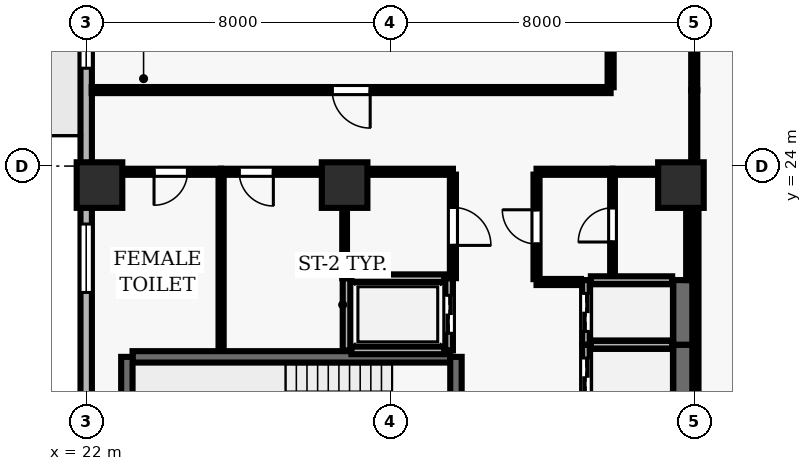
"""IFC4 building model, lengths in metres.
Left out: names, types, materials, properties, quantities, classifications, styles, units other than length and angle.
Written with IfcOpenShell. Run it as: python <this file> out.ifc"""

import sys

from ifc_helpers import new_model, si_unit, direction, frame, frame_2d, origin, origin_2d, place, context, subcontext, project, spatial, rectangle, extrude, element, fill, save


model = new_model("IFC4")
c1 = context("Model", 3, precision=1e-05, world=origin(), true_north=direction((0.0, 1.0)))
c2 = subcontext(c1, "Body", "Model", "MODEL_VIEW")
j1 = project(units=[si_unit("LENGTHUNIT", "METRE"), si_unit("PLANEANGLEUNIT", "RADIAN")], contexts=[c1])
p1 = place(None, origin())
s1 = spatial("IfcSite", under=j1, at=p1, CompositionType="ELEMENT")
p2 = place(p1, origin())
s2 = spatial("IfcBuilding", under=s1, at=p2, CompositionType="ELEMENT")
p3 = place(p2, frame((0.0, 0.0, 111.2)))
s3 = spatial("IfcBuildingStorey", under=s2, at=p3, CompositionType="ELEMENT", Elevation=111.2)
for number, where, z_axis, x_axis in (
    (1, (22.35, 23.5, 0.0), (0.0, 0.0, 1.0), (1.0, 0.0, 0.0)),
    (2, (28.8, 23.5, 0.0), (0.0, 0.0, 1.0), (1.0, 0.0, 0.0)),
    (3, (37.65, 23.5, 0.0), (0.0, 0.0, 1.0), (1.0, 0.0, 0.0)),
):
    element("IfcColumn", number, at=place(p3, frame(where, z_axis=z_axis, x_axis=x_axis)), inside=s3, PredefinedType="COLUMN", context=c2, shape_type="SweptSolid", body=[
        extrude(rectangle(XDim=1.2, YDim=1.2, at=origin_2d()), origin(), (0.0, 0.0, 1.0), 3.9),
    ])
p4 = place(p3, frame((22.0, 46.1, 0.0), z_axis=(0.0, 0.0, 1.0), x_axis=(0.0, -1.0, 0.0)))
e4 = element("IfcWall", 4, at=p4, inside=s3, PredefinedType="SOLIDWALL", context=c2, shape_type="SweptSolid", body=[
    extrude(rectangle(XDim=43.6, YDim=0.3, at=frame_2d((21.8, 0.0))), origin(), (0.0, 0.0, 1.0), 3.69),
])
p5 = place(p4, frame((7.1, 0.0, 0.0)))
e5 = element("IfcOpeningElement", 5, at=p5, cuts=e4, PredefinedType="OPENING", context=c2, shape_type="SweptSolid", body=[
    extrude(rectangle(XDim=1.0, YDim=2.2, at=frame_2d((0.5, 1.1))), frame((0.0, 0.16, 0.0), z_axis=(0.0, -1.0, 0.0), x_axis=(1.0, 0.0, 0.0)), (0.0, 0.0, 1.0), 0.32),
])
p6 = place(p4, frame((1.825, 0.0, 0.9)))
e6 = element("IfcOpeningElement", 6, at=p6, cuts=e4, PredefinedType="OPENING", context=c2, shape_type="SweptSolid", body=[
    extrude(rectangle(XDim=1.8, YDim=1.6, at=frame_2d((0.9, 0.8))), frame((0.0, 0.16, 0.0), z_axis=(0.0, -1.0, 0.0), x_axis=(1.0, 0.0, 0.0)), (0.0, 0.0, 1.0), 0.32),
])
p7 = place(p4, frame((13.175, 0.0, 0.9)))
e7 = element("IfcOpeningElement", 7, at=p7, cuts=e4, PredefinedType="OPENING", context=c2, shape_type="SweptSolid", body=[
    extrude(rectangle(XDim=1.8, YDim=1.6, at=frame_2d((0.9, 0.8))), frame((0.0, 0.16, 0.0), z_axis=(0.0, -1.0, 0.0), x_axis=(1.0, 0.0, 0.0)), (0.0, 0.0, 1.0), 0.32),
])
p8 = place(p4, frame((17.725, 0.0, 0.9)))
e8 = element("IfcOpeningElement", 8, at=p8, cuts=e4, PredefinedType="OPENING", context=c2, shape_type="SweptSolid", body=[
    extrude(rectangle(XDim=1.8, YDim=1.6, at=frame_2d((0.9, 0.8))), frame((0.0, 0.16, 0.0), z_axis=(0.0, -1.0, 0.0), x_axis=(1.0, 0.0, 0.0)), (0.0, 0.0, 1.0), 0.32),
])
p9 = place(p4, frame((23.625, 0.0, 0.9)))
e9 = element("IfcOpeningElement", 9, at=p9, cuts=e4, PredefinedType="OPENING", context=c2, shape_type="SweptSolid", body=[
    extrude(rectangle(XDim=1.8, YDim=1.6, at=frame_2d((0.9, 0.8))), frame((0.0, 0.16, 0.0), z_axis=(0.0, -1.0, 0.0), x_axis=(1.0, 0.0, 0.0)), (0.0, 0.0, 1.0), 0.32),
])
p10 = place(p4, frame((28.625, 0.0, 0.9)))
e10 = element("IfcOpeningElement", 10, at=p10, cuts=e4, PredefinedType="OPENING", context=c2, shape_type="SweptSolid", body=[
    extrude(rectangle(XDim=1.8, YDim=1.6, at=frame_2d((0.9, 0.8))), frame((0.0, 0.16, 0.0), z_axis=(0.0, -1.0, 0.0), x_axis=(1.0, 0.0, 0.0)), (0.0, 0.0, 1.0), 0.32),
])
p11 = place(p4, frame((34.525, 0.0, 0.9)))
e11 = element("IfcOpeningElement", 11, at=p11, cuts=e4, PredefinedType="OPENING", context=c2, shape_type="SweptSolid", body=[
    extrude(rectangle(XDim=1.8, YDim=1.6, at=frame_2d((0.9, 0.8))), frame((0.0, 0.16, 0.0), z_axis=(0.0, -1.0, 0.0), x_axis=(1.0, 0.0, 0.0)), (0.0, 0.0, 1.0), 0.32),
])
p12 = place(p3, frame((31.58, 18.98, 0.0), z_axis=(0.0, 0.0, 1.0), x_axis=(-1.0, 0.0, 0.0)))
e12 = element("IfcWall", 12, at=p12, inside=s3, PredefinedType="SHEAR", context=c2, shape_type="SweptSolid", body=[
    extrude(rectangle(XDim=8.36, YDim=0.3, at=frame_2d((4.18, 0.0))), origin(), (0.0, 0.0, 1.0), 3.69),
])
p13 = place(p3, frame((23.07, 18.98, 0.0), z_axis=(0.0, 0.0, 1.0), x_axis=(0.0, -1.0, 0.0)))
e13 = element("IfcWall", 13, at=p13, inside=s3, PredefinedType="SHEAR", context=c2, shape_type="SweptSolid", body=[
    extrude(rectangle(XDim=3.51, YDim=0.3, at=frame_2d((1.755, 0.0))), origin(), (0.0, 0.0, 1.0), 3.69),
])
p14 = place(p3, frame((31.73, 15.47, 0.0), z_axis=(0.0, 0.0, 1.0), x_axis=(0.0, 1.0, 0.0)))
e14 = element("IfcWall", 14, at=p14, inside=s3, PredefinedType="SHEAR", context=c2, shape_type="SweptSolid", body=[
    extrude(rectangle(XDim=3.51, YDim=0.3, at=frame_2d((1.755, 0.0))), origin(), (0.0, 0.0, 1.0), 3.69),
])
p15 = place(p14, frame((1.18, 0.0, 0.0)))
e15 = element("IfcOpeningElement", 15, at=p15, cuts=e14, PredefinedType="OPENING", context=c2, shape_type="SweptSolid", body=[
    extrude(rectangle(XDim=1.15, YDim=2.15, at=frame_2d((0.575, 1.075))), frame((0.0, 0.16, 0.0), z_axis=(0.0, -1.0, 0.0), x_axis=(1.0, 0.0, 0.0)), (0.0, 0.0, 1.0), 0.32),
])
p16 = place(p3, frame((35.15, 19.3, 0.0), z_axis=(0.0, 0.0, 1.0), x_axis=(0.0, -1.0, 0.0)))
e16 = element("IfcWall", 16, at=p16, inside=s3, PredefinedType="SOLIDWALL", context=c2, shape_type="SweptSolid", body=[
    extrude(rectangle(XDim=1.7, YDim=0.2, at=frame_2d((0.85, 0.0))), origin(), (0.0, 0.0, 1.0), 3.69),
])
p17 = place(p16, frame((0.35, 0.0, 0.0)))
e17 = element("IfcOpeningElement", 17, at=p17, cuts=e16, PredefinedType="OPENING", context=c2, shape_type="SweptSolid", body=[
    extrude(rectangle(XDim=1.0, YDim=2.1, at=frame_2d((0.5, 1.05))), frame((0.0, 0.11, 0.0), z_axis=(0.0, -1.0, 0.0), x_axis=(1.0, 0.0, 0.0)), (0.0, 0.0, 1.0), 0.22),
])
p18 = place(p3, frame((37.7, 17.6, 0.0), z_axis=(0.0, 0.0, 1.0), x_axis=(0.0, 1.0, 0.0)))
e18 = element("IfcWall", 18, at=p18, inside=s3, PredefinedType="SHEAR", context=c2, shape_type="SweptSolid", body=[
    extrude(rectangle(XDim=1.7, YDim=0.5, at=frame_2d((0.85, 0.0))), origin(), (0.0, 0.0, 1.0), 3.69),
])
p19 = place(p3, frame((37.42, 19.3, 0.0), z_axis=(0.0, 0.0, 1.0), x_axis=(-1.0, 0.0, 0.0)))
e19 = element("IfcWall", 19, at=p19, inside=s3, PredefinedType="SOLIDWALL", context=c2, shape_type="SweptSolid", body=[
    extrude(rectangle(XDim=2.14, YDim=0.2, at=frame_2d((1.07, 0.0))), origin(), (0.0, 0.0, 1.0), 3.69),
])
p20 = place(p3, frame((35.15, 21.0, 0.0), z_axis=(0.0, 0.0, 1.0), x_axis=(0.0, -1.0, 0.0)))
e20 = element("IfcWall", 20, at=p20, inside=s3, PredefinedType="SOLIDWALL", context=c2, shape_type="SweptSolid", body=[
    extrude(rectangle(XDim=1.7, YDim=0.2, at=frame_2d((0.85, 0.0))), origin(), (0.0, 0.0, 1.0), 3.69),
])
p21 = place(p20, frame((0.35, 0.0, 0.0)))
e21 = element("IfcOpeningElement", 21, at=p21, cuts=e20, PredefinedType="OPENING", context=c2, shape_type="SweptSolid", body=[
    extrude(rectangle(XDim=1.0, YDim=2.1, at=frame_2d((0.5, 1.05))), frame((0.0, 0.11, 0.0), z_axis=(0.0, -1.0, 0.0), x_axis=(1.0, 0.0, 0.0)), (0.0, 0.0, 1.0), 0.22),
])
p22 = place(p3, frame((37.7, 19.3, 0.0), z_axis=(0.0, 0.0, 1.0), x_axis=(0.0, 1.0, 0.0)))
e22 = element("IfcWall", 22, at=p22, inside=s3, PredefinedType="SHEAR", context=c2, shape_type="SweptSolid", body=[
    extrude(rectangle(XDim=1.7, YDim=0.5, at=frame_2d((0.85, 0.0))), origin(), (0.0, 0.0, 1.0), 3.69),
])
p23 = place(p3, frame((37.42, 21.0, 0.0), z_axis=(0.0, 0.0, 1.0), x_axis=(-1.0, 0.0, 0.0)))
e23 = element("IfcWall", 23, at=p23, inside=s3, PredefinedType="SOLIDWALL", context=c2, shape_type="SweptSolid", body=[
    extrude(rectangle(XDim=2.14, YDim=0.2, at=frame_2d((1.07, 0.0))), origin(), (0.0, 0.0, 1.0), 3.69),
])
p24 = place(p3, frame((28.85, 21.05, 0.0), z_axis=(0.0, 0.0, 1.0), x_axis=(0.0, -1.0, 0.0)))
e24 = element("IfcWall", 24, at=p24, inside=s3, PredefinedType="SOLIDWALL", context=c2, shape_type="SweptSolid", body=[
    extrude(rectangle(XDim=1.9, YDim=0.2, at=frame_2d((0.95, 0.0))), origin(), (0.0, 0.0, 1.0), 3.69),
])
p25 = place(p3, frame((31.55, 19.15, 0.0), z_axis=(0.0, 0.0, 1.0), x_axis=(0.0, 1.0, 0.0)))
e25 = element("IfcWall", 25, at=p25, inside=s3, PredefinedType="SOLIDWALL", context=c2, shape_type="SweptSolid", body=[
    extrude(rectangle(XDim=1.9, YDim=0.2, at=frame_2d((0.95, 0.0))), origin(), (0.0, 0.0, 1.0), 3.69),
])
p26 = place(p25, frame((0.45, 0.0, 0.0)))
e26 = element("IfcOpeningElement", 26, at=p26, cuts=e25, PredefinedType="OPENING", context=c2, shape_type="SweptSolid", body=[
    extrude(rectangle(XDim=1.0, YDim=2.1, at=frame_2d((0.5, 1.05))), frame((0.0, 0.11, 0.0), z_axis=(0.0, -1.0, 0.0), x_axis=(1.0, 0.0, 0.0)), (0.0, 0.0, 1.0), 0.22),
])
for number, where, z_axis, x_axis in (
    (27, (28.98, 19.15, 0.0), (0.0, 0.0, 1.0), (1.0, 0.0, 0.0)),
    (28, (31.42, 21.05, 0.0), (0.0, 0.0, 1.0), (-1.0, 0.0, 0.0)),
):
    element("IfcWall", number, at=place(p3, frame(where, z_axis=z_axis, x_axis=x_axis)), inside=s3, PredefinedType="SOLIDWALL", context=c2, shape_type="SweptSolid", body=[
        extrude(rectangle(XDim=2.44, YDim=0.2, at=frame_2d((1.22, 0.0))), origin(), (0.0, 0.0, 1.0), 3.69),
    ])
p27 = place(p3, frame((25.55, 23.85, 0.0), z_axis=(0.0, 0.0, 1.0), x_axis=(-1.0, 0.0, 0.0)))
e29 = element("IfcWall", 29, at=p27, inside=s3, PredefinedType="PARTITIONING", context=c2, shape_type="SweptSolid", body=[
    extrude(rectangle(XDim=3.35, YDim=0.16, at=frame_2d((1.675, 0.0))), origin(), (0.0, 0.0, 1.0), 3.074),
])
p28 = place(p27, frame((0.885, 0.0, 0.0)))
e30 = element("IfcOpeningElement", 30, at=p28, cuts=e29, PredefinedType="OPENING", context=c2, shape_type="SweptSolid", body=[
    extrude(rectangle(XDim=0.88, YDim=2.1, at=frame_2d((0.44, 1.05))), frame((0.0, 0.09, 0.0), z_axis=(0.0, -1.0, 0.0), x_axis=(1.0, 0.0, 0.0)), (0.0, 0.0, 1.0), 0.18),
])
p29 = place(p3, frame((28.8, 23.85, 0.0), z_axis=(0.0, 0.0, 1.0), x_axis=(-1.0, 0.0, 0.0)))
e31 = element("IfcWall", 31, at=p29, inside=s3, PredefinedType="PARTITIONING", context=c2, shape_type="SweptSolid", body=[
    extrude(rectangle(XDim=3.25, YDim=0.16, at=frame_2d((1.625, 0.0))), origin(), (0.0, 0.0, 1.0), 3.074),
])
p30 = place(p29, frame((1.875, 0.0, 0.0)))
e32 = element("IfcOpeningElement", 32, at=p30, cuts=e31, PredefinedType="OPENING", context=c2, shape_type="SweptSolid", body=[
    extrude(rectangle(XDim=0.9, YDim=2.1, at=frame_2d((0.45, 1.05))), frame((0.0, 0.09, 0.0), z_axis=(0.0, -1.0, 0.0), x_axis=(1.0, 0.0, 0.0)), (0.0, 0.0, 1.0), 0.18),
])
p31 = place(p3, frame((31.65, 23.85, 0.0), z_axis=(0.0, 0.0, 1.0), x_axis=(-1.0, 0.0, 0.0)))
e33 = element("IfcWall", 33, at=p31, inside=s3, PredefinedType="PARTITIONING", context=c2, shape_type="SweptSolid", body=[
    extrude(rectangle(XDim=2.85, YDim=0.16, at=frame_2d((1.425, 0.0))), origin(), (0.0, 0.0, 1.0), 3.074),
])
p32 = place(p3, frame((35.02, 20.95, 0.0), z_axis=(0.0, 0.0, 1.0), x_axis=(-1.0, 0.0, 0.0)))
e34 = element("IfcWall", 34, at=p32, inside=s3, PredefinedType="PARTITIONING", context=c2, shape_type="SweptSolid", body=[
    extrude(rectangle(XDim=1.17, YDim=0.16, at=frame_2d((0.585, 0.0))), origin(), (0.0, 0.0, 1.0), 3.69),
])
p33 = place(p3, frame((35.8, 26.0, 0.0), z_axis=(0.0, 0.0, 1.0), x_axis=(-1.0, 0.0, 0.0)))
e35 = element("IfcWall", 35, at=p33, inside=s3, PredefinedType="PARTITIONING", context=c2, shape_type="SweptSolid", body=[
    extrude(rectangle(XDim=13.655, YDim=0.16, at=frame_2d((6.828, 0.0))), origin(), (0.0, 0.0, 1.0), 3.69),
])
p34 = place(p33, frame((6.327, 0.0, 0.0)))
e36 = element("IfcOpeningElement", 36, at=p34, cuts=e35, PredefinedType="OPENING", context=c2, shape_type="SweptSolid", body=[
    extrude(rectangle(XDim=1.0, YDim=2.1, at=frame_2d((0.5, 1.05))), frame((0.0, 0.09, 0.0), z_axis=(0.0, -1.0, 0.0), x_axis=(1.0, 0.0, 0.0)), (0.0, 0.0, 1.0), 0.18),
])
for number, where, z_axis, x_axis in (
    (37, (35.85, 23.85, 0.0), (0.0, 0.0, 1.0), (-1.0, 0.0, 0.0)),
    (38, (37.85, 23.85, 0.0), (0.0, 0.0, 1.0), (-1.0, 0.0, 0.0)),
):
    element("IfcWall", number, at=place(p3, frame(where, z_axis=z_axis, x_axis=x_axis)), inside=s3, PredefinedType="PARTITIONING", context=c2, shape_type="SweptSolid", body=[
        extrude(rectangle(XDim=2.0, YDim=0.16, at=frame_2d((1.0, 0.0))), origin(), (0.0, 0.0, 1.0), 3.074),
    ])
p35 = place(p3, frame((25.55, 19.16, 0.0), z_axis=(0.0, 0.0, 1.0), x_axis=(0.0, 1.0, 0.0)))
e39 = element("IfcWall", 39, at=p35, inside=s3, PredefinedType="PARTITIONING", context=c2, shape_type="SweptSolid", body=[
    extrude(rectangle(XDim=4.615, YDim=0.135, at=frame_2d((2.308, 0.0))), origin(), (0.0, 0.0, 1.0), 3.69),
])
p36 = place(p3, frame((28.8, 23.775, 0.0), z_axis=(0.0, 0.0, 1.0), x_axis=(0.0, -1.0, 0.0)))
e40 = element("IfcWall", 40, at=p36, inside=s3, PredefinedType="PARTITIONING", context=c2, shape_type="SweptSolid", body=[
    extrude(rectangle(XDim=2.725, YDim=0.125, at=frame_2d((1.362, 0.0))), origin(), (0.0, 0.0, 1.0), 3.69),
])
p37 = place(p3, frame((31.65, 23.775, 0.0), z_axis=(0.0, 0.0, 1.0), x_axis=(0.0, -1.0, 0.0)))
e41 = element("IfcWall", 41, at=p37, inside=s3, PredefinedType="PARTITIONING", context=c2, shape_type="SweptSolid", body=[
    extrude(rectangle(XDim=2.725, YDim=0.16, at=frame_2d((1.362, 0.0))), origin(), (0.0, 0.0, 1.0), 3.69),
])
p38 = place(p37, frame((0.862, 0.0, 0.0)))
e42 = element("IfcOpeningElement", 42, at=p38, cuts=e41, PredefinedType="OPENING", context=c2, shape_type="SweptSolid", body=[
    extrude(rectangle(XDim=1.0, YDim=2.1, at=frame_2d((0.5, 1.05))), frame((0.0, 0.09, 0.0), z_axis=(0.0, -1.0, 0.0), x_axis=(1.0, 0.0, 0.0)), (0.0, 0.0, 1.0), 0.18),
])
p39 = place(p3, frame((33.85, 21.025, 0.0), z_axis=(0.0, 0.0, 1.0), x_axis=(0.0, 1.0, 0.0)))
e43 = element("IfcWall", 43, at=p39, inside=s3, PredefinedType="PARTITIONING", context=c2, shape_type="SweptSolid", body=[
    extrude(rectangle(XDim=2.75, YDim=0.16, at=frame_2d((1.375, 0.0))), origin(), (0.0, 0.0, 1.0), 3.69),
])
p40 = place(p39, frame((0.925, 0.0, 0.0)))
e44 = element("IfcOpeningElement", 44, at=p40, cuts=e43, PredefinedType="OPENING", context=c2, shape_type="SweptSolid", body=[
    extrude(rectangle(XDim=0.9, YDim=2.1, at=frame_2d((0.45, 1.05))), frame((0.0, 0.09, 0.0), z_axis=(0.0, -1.0, 0.0), x_axis=(1.0, 0.0, 0.0)), (0.0, 0.0, 1.0), 0.18),
])
p41 = place(p3, frame((35.8, 33.612, 0.0), z_axis=(0.0, 0.0, 1.0), x_axis=(0.0, -1.0, 0.0)))
e45 = element("IfcWall", 45, at=p41, inside=s3, PredefinedType="PARTITIONING", context=c2, shape_type="SweptSolid", body=[
    extrude(rectangle(XDim=7.537, YDim=0.16, at=frame_2d((3.769, 0.0))), origin(), (0.0, 0.0, 1.0), 3.69),
])
p42 = place(p3, frame((35.85, 21.13, 0.0), z_axis=(0.0, 0.0, 1.0), x_axis=(0.0, 1.0, 0.0)))
e46 = element("IfcWall", 46, at=p42, inside=s3, PredefinedType="PARTITIONING", context=c2, shape_type="SweptSolid", body=[
    extrude(rectangle(XDim=2.645, YDim=0.125, at=frame_2d((1.323, 0.0))), origin(), (0.0, 0.0, 1.0), 3.69),
])
p43 = place(p42, frame((0.872, 0.0, 0.0)))
e47 = element("IfcOpeningElement", 47, at=p43, cuts=e46, PredefinedType="OPENING", context=c2, shape_type="SweptSolid", body=[
    extrude(rectangle(XDim=0.9, YDim=2.1, at=frame_2d((0.45, 1.05))), frame((0.0, 0.073, 0.0), z_axis=(0.0, -1.0, 0.0), x_axis=(1.0, 0.0, 0.0)), (0.0, 0.0, 1.0), 0.145),
])
p44 = place(p3, frame((37.85, 21.0, 0.0), z_axis=(0.0, 0.0, 1.0), x_axis=(0.0, 1.0, 0.0)))
e48 = element("IfcWall", 48, at=p44, inside=s3, PredefinedType="PARTITIONING", context=c2, shape_type="SweptSolid", body=[
    extrude(rectangle(XDim=2.775, YDim=0.125, at=frame_2d((1.387, 0.0))), origin(), (0.0, 0.0, 1.0), 3.074),
])
p45 = place(p3, frame((38.0, 23.85, 0.0), z_axis=(0.0, 0.0, 1.0), x_axis=(0.0, 1.0, 0.0)))
e49 = element("IfcWall", 49, at=p45, inside=s3, PredefinedType="PARTITIONING", context=c2, shape_type="SweptSolid", body=[
    extrude(rectangle(XDim=2.15, YDim=0.16, at=frame_2d((1.075, 0.0))), origin(), (0.0, 0.0, 1.0), 3.074),
])
p46 = place(p3, frame((38.0, 26.0, 0.0), z_axis=(0.0, 0.0, 1.0), x_axis=(0.0, 1.0, 0.0)))
e50 = element("IfcWall", 50, at=p46, inside=s3, PredefinedType="PARTITIONING", context=c2, shape_type="SweptSolid", body=[
    extrude(rectangle(XDim=4.655, YDim=0.16, at=frame_2d((2.328, 0.0))), origin(), (0.0, 0.0, 1.0), 3.074),
])
p47 = place(p3, frame((38.05, 23.85, 0.0), z_axis=(0.0, 0.0, 1.0), x_axis=(0.0, -1.0, 0.0)))
e51 = element("IfcWall", 51, at=p47, inside=s3, PredefinedType="PARTITIONING", context=c2, shape_type="SweptSolid", body=[
    extrude(rectangle(XDim=7.775, YDim=0.125, at=frame_2d((3.888, 0.0))), origin(), (0.0, 0.0, 1.0), 3.074),
])
p48 = place(p8, origin())
e52 = element("IfcWindow", 52, at=p48, inside=s3, PartitioningType="SINGLE_PANEL", PredefinedType="WINDOW", context=c2, shape_type="SweptSolid", body=[
    extrude(rectangle(XDim=1.8, YDim=1.6, at=frame_2d((0.9, 0.8))), frame((0.0, 0.03, 0.0), z_axis=(0.0, -1.0, 0.0), x_axis=(1.0, 0.0, 0.0)), (0.0, 0.0, 1.0), 0.06),
])
fill(e8, e52)
p49 = place(p9, origin())
e53 = element("IfcWindow", 53, at=p49, inside=s3, PartitioningType="SINGLE_PANEL", PredefinedType="WINDOW", context=c2, shape_type="SweptSolid", body=[
    extrude(rectangle(XDim=1.8, YDim=1.6, at=frame_2d((0.9, 0.8))), frame((0.0, 0.03, 0.0), z_axis=(0.0, -1.0, 0.0), x_axis=(1.0, 0.0, 0.0)), (0.0, 0.0, 1.0), 0.06),
])
fill(e9, e53)
p50 = place(p17, origin())
e54 = element("IfcDoor", 54, at=p50, inside=s3, OperationType="DOUBLE_DOOR_SLIDING", PredefinedType="DOOR", context=c2, shape_type="SweptSolid", body=[
    extrude(rectangle(XDim=1.0, YDim=2.1, at=frame_2d((0.5, 1.05))), frame((0.0, 0.025, 0.0), z_axis=(0.0, -1.0, 0.0), x_axis=(1.0, 0.0, 0.0)), (0.0, 0.0, 1.0), 0.05),
])
fill(e17, e54)
p51 = place(p21, origin())
e55 = element("IfcDoor", 55, at=p51, inside=s3, OperationType="DOUBLE_DOOR_SLIDING", PredefinedType="DOOR", context=c2, shape_type="SweptSolid", body=[
    extrude(rectangle(XDim=1.0, YDim=2.1, at=frame_2d((0.5, 1.05))), frame((0.0, 0.025, 0.0), z_axis=(0.0, -1.0, 0.0), x_axis=(1.0, 0.0, 0.0)), (0.0, 0.0, 1.0), 0.05),
])
fill(e21, e55)
p52 = place(p26, origin())
e56 = element("IfcDoor", 56, at=p52, inside=s3, OperationType="DOUBLE_DOOR_SLIDING", PredefinedType="DOOR", context=c2, shape_type="SweptSolid", body=[
    extrude(rectangle(XDim=1.0, YDim=2.1, at=frame_2d((0.5, 1.05))), frame((0.0, 0.025, 0.0), z_axis=(0.0, -1.0, 0.0), x_axis=(1.0, 0.0, 0.0)), (0.0, 0.0, 1.0), 0.05),
])
fill(e26, e56)
p53 = place(p40, origin())
e57 = element("IfcDoor", 57, at=p53, inside=s3, OperationType="SINGLE_SWING_RIGHT", PredefinedType="DOOR", context=c2, shape_type="SweptSolid", body=[
    extrude(rectangle(XDim=0.9, YDim=2.1, at=frame_2d((0.45, 1.05))), frame((0.0, 0.025, 0.0), z_axis=(0.0, -1.0, 0.0), x_axis=(1.0, 0.0, 0.0)), (0.0, 0.0, 1.0), 0.05),
])
fill(e44, e57)
p54 = place(p43, origin())
e58 = element("IfcDoor", 58, at=p54, inside=s3, OperationType="SINGLE_SWING_LEFT", PredefinedType="DOOR", context=c2, shape_type="SweptSolid", body=[
    extrude(rectangle(XDim=0.9, YDim=2.1, at=frame_2d((0.45, 1.05))), frame((0.0, 0.025, 0.0), z_axis=(0.0, -1.0, 0.0), x_axis=(1.0, 0.0, 0.0)), (0.0, 0.0, 1.0), 0.05),
])
fill(e47, e58)
p55 = place(p38, origin())
e59 = element("IfcDoor", 59, at=p55, inside=s3, OperationType="SINGLE_SWING_RIGHT", PredefinedType="DOOR", context=c2, shape_type="SweptSolid", body=[
    extrude(rectangle(XDim=1.0, YDim=2.1, at=frame_2d((0.5, 1.05))), frame((0.0, 0.025, 0.0), z_axis=(0.0, -1.0, 0.0), x_axis=(1.0, 0.0, 0.0)), (0.0, 0.0, 1.0), 0.05),
])
fill(e42, e59)
p56 = place(p28, origin())
e60 = element("IfcDoor", 60, at=p56, inside=s3, OperationType="SINGLE_SWING_RIGHT", PredefinedType="DOOR", context=c2, shape_type="SweptSolid", body=[
    extrude(rectangle(XDim=0.88, YDim=2.1, at=frame_2d((0.44, 1.05))), frame((0.0, 0.025, 0.0), z_axis=(0.0, -1.0, 0.0), x_axis=(1.0, 0.0, 0.0)), (0.0, 0.0, 1.0), 0.05),
])
fill(e30, e60)
p57 = place(p30, origin())
e61 = element("IfcDoor", 61, at=p57, inside=s3, OperationType="SINGLE_SWING_LEFT", PredefinedType="DOOR", context=c2, shape_type="SweptSolid", body=[
    extrude(rectangle(XDim=0.9, YDim=2.1, at=frame_2d((0.45, 1.05))), frame((0.0, 0.025, 0.0), z_axis=(0.0, -1.0, 0.0), x_axis=(1.0, 0.0, 0.0)), (0.0, 0.0, 1.0), 0.05),
])
fill(e32, e61)
p58 = place(p34, origin())
e62 = element("IfcDoor", 62, at=p58, inside=s3, OperationType="SINGLE_SWING_LEFT", PredefinedType="DOOR", context=c2, shape_type="SweptSolid", body=[
    extrude(rectangle(XDim=1.0, YDim=2.1, at=frame_2d((0.5, 1.05))), frame((0.0, 0.025, 0.0), z_axis=(0.0, -1.0, 0.0), x_axis=(1.0, 0.0, 0.0)), (0.0, 0.0, 1.0), 0.05),
])
fill(e36, e62)
save(model, sys.argv[1])
